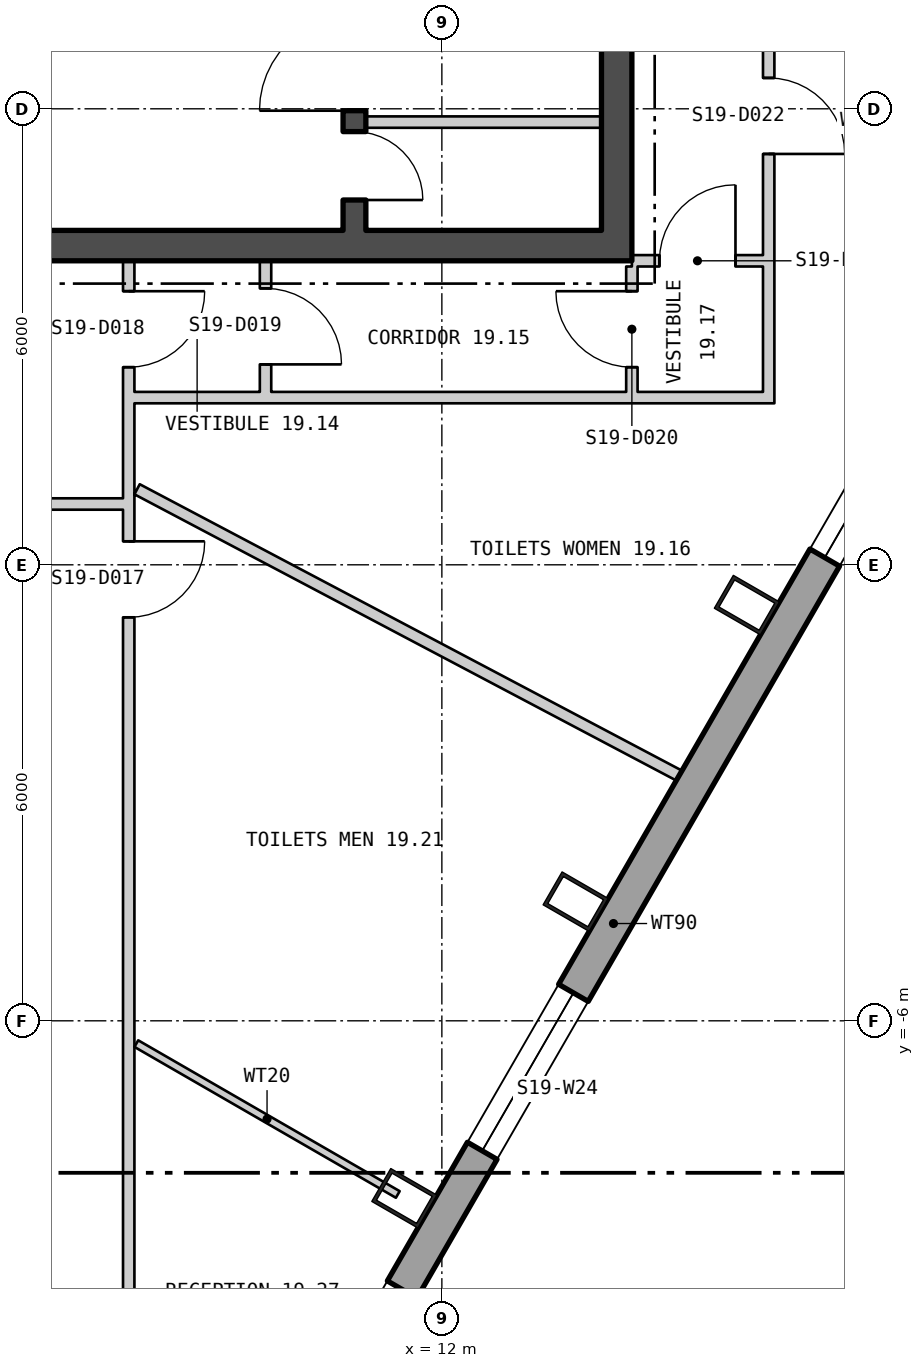
"""IFC4 building model, lengths in metres.
Left out: names, types, materials, properties, quantities, classifications, styles, units other than length and angle.
Written with IfcOpenShell. Run it as: python <this file> out.ifc"""

import sys

from ifc_helpers import new_model, si_unit, direction, frame, frame_2d, origin, origin_2d, place, context, subcontext, project, spatial, polyline, rectangle, hollow_rectangle, outline, extrude, element, fill, save


model = new_model("IFC4")
c1 = context("Model", 3, precision=1e-05, world=origin(), true_north=direction((0.0, 1.0)))
c2 = subcontext(c1, "Body", "Model", "MODEL_VIEW")
j1 = project(units=[si_unit("LENGTHUNIT", "METRE"), si_unit("PLANEANGLEUNIT", "RADIAN")], contexts=[c1])
p1 = place(None, origin())
s1 = spatial("IfcSite", under=j1, at=p1, CompositionType="ELEMENT")
p2 = place(p1, origin())
s2 = spatial("IfcBuilding", under=s1, at=p2, CompositionType="ELEMENT")
p3 = place(p2, frame((0.0, 0.0, 257.1)))
s3 = spatial("IfcBuildingStorey", under=s2, at=p3, CompositionType="ELEMENT", Elevation=257.1)
for number, where, z_axis, x_axis in (
    (1, (11.506, -8.335, 0.0), (0.0, 0.0, 1.0), (0.5, 0.866, 0.0)),
    (2, (13.76, -4.432, 0.0), (0.0, 0.0, 1.0), (0.5, 0.866, 0.0)),
    (3, (16.013, -0.53, 0.0), (0.0, 0.0, 1.0), (0.5, 0.866, 0.0)),
):
    element("IfcColumn", number, at=place(p3, frame(where, z_axis=z_axis, x_axis=x_axis)), inside=s3, PredefinedType="COLUMN", context=c2, shape_type="SweptSolid", body=[
        extrude(hollow_rectangle(XDim=0.5, YDim=0.7, WallThickness=0.045, at=origin_2d()), origin(), (0.0, 0.0, 1.0), 3.9),
    ])
p4 = place(p3, frame((2.825, -24.522, -0.18), z_axis=(0.0, 0.0, 1.0), x_axis=(0.500000141277, 0.866025322218, 0.0)))
e4 = element("IfcWall", 4, at=p4, inside=s3, PredefinedType="SOLIDWALL", context=c2, shape_type="SweptSolid", body=[
    extrude(outline(polyline([(-0.13, -0.225), (45.86, -0.225), (45.6, 0.225), (0.13, 0.225), (-0.13, -0.225)])), origin(), (0.0, 0.0, 1.0), 3.68),
])
p5 = place(p4, frame((1.424, 0.0, 1.08)))
e5 = element("IfcOpeningElement", 5, at=p5, cuts=e4, PredefinedType="OPENING", context=c2, shape_type="SweptSolid", body=[
    extrude(rectangle(XDim=2.4, YDim=2.0, at=frame_2d((1.2, 1.0))), frame((0.0, 0.235, 0.0), z_axis=(0.0, -1.0, 0.0), x_axis=(1.0, 0.0, 0.0)), (0.0, 0.0, 1.0), 0.47),
])
p6 = place(p4, frame((5.892, 0.0, 1.08)))
e6 = element("IfcOpeningElement", 6, at=p6, cuts=e4, PredefinedType="OPENING", context=c2, shape_type="SweptSolid", body=[
    extrude(rectangle(XDim=2.4, YDim=2.0, at=frame_2d((1.2, 1.0))), frame((0.0, 0.235, 0.0), z_axis=(0.0, -1.0, 0.0), x_axis=(1.0, 0.0, 0.0)), (0.0, 0.0, 1.0), 0.47),
])
p7 = place(p4, frame((10.399, 0.0, 1.08)))
e7 = element("IfcOpeningElement", 7, at=p7, cuts=e4, PredefinedType="OPENING", context=c2, shape_type="SweptSolid", body=[
    extrude(rectangle(XDim=2.4, YDim=2.0, at=frame_2d((1.2, 1.0))), frame((0.0, 0.235, 0.0), z_axis=(0.0, -1.0, 0.0), x_axis=(1.0, 0.0, 0.0)), (0.0, 0.0, 1.0), 0.47),
])
p8 = place(p4, frame((14.905, 0.0, 1.08)))
e8 = element("IfcOpeningElement", 8, at=p8, cuts=e4, PredefinedType="OPENING", context=c2, shape_type="SweptSolid", body=[
    extrude(rectangle(XDim=2.4, YDim=2.0, at=frame_2d((1.2, 1.0))), frame((0.0, 0.235, 0.0), z_axis=(0.0, -1.0, 0.0), x_axis=(1.0, 0.0, 0.0)), (0.0, 0.0, 1.0), 0.47),
])
p9 = place(p4, frame((19.412, 0.0, 1.08)))
e9 = element("IfcOpeningElement", 9, at=p9, cuts=e4, PredefinedType="OPENING", context=c2, shape_type="SweptSolid", body=[
    extrude(rectangle(XDim=2.4, YDim=2.0, at=frame_2d((1.2, 1.0))), frame((0.0, 0.235, 0.0), z_axis=(0.0, -1.0, 0.0), x_axis=(1.0, 0.0, 0.0)), (0.0, 0.0, 1.0), 0.47),
])
p10 = place(p4, frame((28.425, 0.0, 1.08)))
e10 = element("IfcOpeningElement", 10, at=p10, cuts=e4, PredefinedType="OPENING", context=c2, shape_type="SweptSolid", body=[
    extrude(rectangle(XDim=2.4, YDim=2.0, at=frame_2d((1.2, 1.0))), frame((0.0, 0.235, 0.0), z_axis=(0.0, -1.0, 0.0), x_axis=(1.0, 0.0, 0.0)), (0.0, 0.0, 1.0), 0.47),
])
p11 = place(p4, frame((37.438, 0.0, 1.08)))
e11 = element("IfcOpeningElement", 11, at=p11, cuts=e4, PredefinedType="OPENING", context=c2, shape_type="SweptSolid", body=[
    extrude(rectangle(XDim=2.4, YDim=2.0, at=frame_2d((1.2, 1.0))), frame((0.0, 0.235, 0.0), z_axis=(0.0, -1.0, 0.0), x_axis=(1.0, 0.0, 0.0)), (0.0, 0.0, 1.0), 0.47),
])
p12 = place(p4, frame((41.907, 0.0, 1.08)))
e12 = element("IfcOpeningElement", 12, at=p12, cuts=e4, PredefinedType="OPENING", context=c2, shape_type="SweptSolid", body=[
    extrude(rectangle(XDim=2.4, YDim=2.0, at=frame_2d((1.2, 1.0))), frame((0.0, 0.235, 0.0), z_axis=(0.0, -1.0, 0.0), x_axis=(1.0, 0.0, 0.0)), (0.0, 0.0, 1.0), 0.47),
])
p13 = place(p3, frame((-14.5, 4.2, 0.0), z_axis=(0.0, 0.0, 1.0), x_axis=(1.0, 0.0, 0.0)))
e13 = element("IfcWall", 13, at=p13, inside=s3, PredefinedType="SHEAR", context=c2, shape_type="SweptSolid", body=[
    extrude(rectangle(XDim=29.0, YDim=0.4, at=frame_2d((14.5, 0.0))), origin(), (0.0, 0.0, 1.0), 3.7),
])
p14 = place(p13, frame((9.0, 0.0, 0.0)))
e14 = element("IfcOpeningElement", 14, at=p14, cuts=e13, PredefinedType="OPENING", context=c2, shape_type="SweptSolid", body=[
    extrude(rectangle(XDim=1.8, YDim=2.4, at=frame_2d((0.9, 1.2))), frame((0.0, 0.21, 0.0), z_axis=(0.0, -1.0, 0.0), x_axis=(1.0, 0.0, 0.0)), (0.0, 0.0, 1.0), 0.42),
])
p15 = place(p13, frame((19.0, 0.0, 0.0)))
e15 = element("IfcOpeningElement", 15, at=p15, cuts=e13, PredefinedType="OPENING", context=c2, shape_type="SweptSolid", body=[
    extrude(rectangle(XDim=1.8, YDim=2.4, at=frame_2d((0.9, 1.2))), frame((0.0, 0.21, 0.0), z_axis=(0.0, -1.0, 0.0), x_axis=(1.0, 0.0, 0.0)), (0.0, 0.0, 1.0), 0.42),
])
p16 = place(p3, frame((14.3, 4.4, 0.0), z_axis=(0.0, 0.0, 1.0), x_axis=(0.0, 1.0, 0.0)))
e16 = element("IfcWall", 16, at=p16, inside=s3, PredefinedType="SHEAR", context=c2, shape_type="SweptSolid", body=[
    extrude(rectangle(XDim=13.2, YDim=0.4, at=frame_2d((6.6, 0.0))), origin(), (0.0, 0.0, 1.0), 3.7),
])
p17 = place(p16, frame((3.05, 0.0, 0.0)))
e17 = element("IfcOpeningElement", 17, at=p17, cuts=e16, PredefinedType="OPENING", context=c2, shape_type="SweptSolid", body=[
    extrude(rectangle(XDim=1.5, YDim=2.1, at=frame_2d((0.75, 1.05))), frame((0.0, 0.21, 0.0), z_axis=(0.0, -1.0, 0.0), x_axis=(1.0, 0.0, 0.0)), (0.0, 0.0, 1.0), 0.42),
])
p18 = place(p3, frame((10.85, 4.4, 0.0), z_axis=(0.0, 0.0, 1.0), x_axis=(0.0, 1.0, 0.0)))
e18 = element("IfcWall", 18, at=p18, inside=s3, PredefinedType="SHEAR", context=c2, shape_type="SweptSolid", body=[
    extrude(rectangle(XDim=13.2, YDim=0.3, at=frame_2d((6.6, 0.0))), origin(), (0.0, 0.0, 1.0), 3.7),
])
p19 = place(p18, frame((1.575, 0.0, 0.0)))
e19 = element("IfcOpeningElement", 19, at=p19, cuts=e18, PredefinedType="OPENING", context=c2, shape_type="SweptSolid", body=[
    extrude(rectangle(XDim=1.25, YDim=2.1, at=frame_2d((0.625, 1.05))), frame((0.0, 0.16, 0.0), z_axis=(0.0, -1.0, 0.0), x_axis=(1.0, 0.0, 0.0)), (0.0, 0.0, 1.0), 0.32),
])
p20 = place(p18, frame((0.4, 0.0, 0.0)))
e20 = element("IfcOpeningElement", 20, at=p20, cuts=e18, PredefinedType="OPENING", context=c2, shape_type="SweptSolid", body=[
    extrude(rectangle(XDim=0.9, YDim=2.1, at=frame_2d((0.45, 1.05))), frame((0.0, 0.16, 0.0), z_axis=(0.0, -1.0, 0.0), x_axis=(1.0, 0.0, 0.0)), (0.0, 0.0, 1.0), 0.32),
])
p21 = place(p3, frame((11.0, 5.825, 0.0), z_axis=(0.0, 0.0, 1.0), x_axis=(1.0, 0.0, 0.0)))
e21 = element("IfcWall", 21, at=p21, inside=s3, PredefinedType="PARTITIONING", context=c2, shape_type="SweptSolid", body=[
    extrude(rectangle(XDim=3.1, YDim=0.15, at=frame_2d((1.55, 0.0))), origin(), (0.0, 0.0, 1.0), 3.7),
])
p22 = place(p3, frame((-7.805, 0.8, 0.0), z_axis=(0.0, 0.0, 1.0), x_axis=(1.0, 0.0, 0.0)))
e22 = element("IfcWall", 22, at=p22, inside=s3, PredefinedType="PARTITIONING", context=c2, shape_type="SweptSolid", body=[
    extrude(rectangle(XDim=15.61, YDim=0.15, at=frame_2d((7.805, 0.0))), origin(), (0.0, 0.0, 1.0), 3.7),
])
p23 = place(p22, frame((1.168, 0.0, 0.0)))
e23 = element("IfcOpeningElement", 23, at=p23, cuts=e22, PredefinedType="OPENING", context=c2, shape_type="SweptSolid", body=[
    extrude(rectangle(XDim=1.0, YDim=2.1, at=frame_2d((0.5, 1.05))), frame((0.0, 0.085, 0.0), z_axis=(0.0, -1.0, 0.0), x_axis=(1.0, 0.0, 0.0)), (0.0, 0.0, 1.0), 0.17),
])
p24 = place(p22, frame((6.399, 0.0, 0.0)))
e24 = element("IfcOpeningElement", 24, at=p24, cuts=e22, PredefinedType="OPENING", context=c2, shape_type="SweptSolid", body=[
    extrude(rectangle(XDim=1.0, YDim=2.1, at=frame_2d((0.5, 1.05))), frame((0.0, 0.085, 0.0), z_axis=(0.0, -1.0, 0.0), x_axis=(1.0, 0.0, 0.0)), (0.0, 0.0, 1.0), 0.17),
])
p25 = place(p22, frame((8.006, 0.0, 0.0)))
e25 = element("IfcOpeningElement", 25, at=p25, cuts=e22, PredefinedType="OPENING", context=c2, shape_type="SweptSolid", body=[
    extrude(rectangle(XDim=1.0, YDim=2.1, at=frame_2d((0.5, 1.05))), frame((0.0, 0.085, 0.0), z_axis=(0.0, -1.0, 0.0), x_axis=(1.0, 0.0, 0.0)), (0.0, 0.0, 1.0), 0.17),
])
p26 = place(p22, frame((13.441, 0.0, 0.0)))
e26 = element("IfcOpeningElement", 26, at=p26, cuts=e22, PredefinedType="OPENING", context=c2, shape_type="SweptSolid", body=[
    extrude(rectangle(XDim=1.0, YDim=2.1, at=frame_2d((0.5, 1.05))), frame((0.0, 0.085, 0.0), z_axis=(0.0, -1.0, 0.0), x_axis=(1.0, 0.0, 0.0)), (0.0, 0.0, 1.0), 0.17),
])
p27 = place(p3, frame((7.88, -13.675, 0.0), z_axis=(0.0, 0.0, 1.0), x_axis=(0.0, 1.0, 0.0)))
e27 = element("IfcWall", 27, at=p27, inside=s3, PredefinedType="PARTITIONING", context=c2, shape_type="SweptSolid", body=[
    extrude(rectangle(XDim=17.675, YDim=0.15, at=frame_2d((8.838, 0.0))), origin(), (0.0, 0.0, 1.0), 3.7),
])
p28 = place(p27, frame((12.984, 0.0, 0.0)))
e28 = element("IfcOpeningElement", 28, at=p28, cuts=e27, PredefinedType="OPENING", context=c2, shape_type="SweptSolid", body=[
    extrude(rectangle(XDim=1.0, YDim=2.1, at=frame_2d((0.5, 1.05))), frame((0.0, 0.085, 0.0), z_axis=(0.0, -1.0, 0.0), x_axis=(1.0, 0.0, 0.0)), (0.0, 0.0, 1.0), 0.17),
])
p29 = place(p27, frame((16.275, 0.0, 0.0)))
e29 = element("IfcOpeningElement", 29, at=p29, cuts=e27, PredefinedType="OPENING", context=c2, shape_type="SweptSolid", body=[
    extrude(rectangle(XDim=1.0, YDim=2.1, at=frame_2d((0.5, 1.05))), frame((0.0, 0.085, 0.0), z_axis=(0.0, -1.0, 0.0), x_axis=(1.0, 0.0, 0.0)), (0.0, 0.0, 1.0), 0.17),
])
p30 = place(p3, frame((7.955, 2.2, 0.0), z_axis=(0.0, 0.0, 1.0), x_axis=(1.0, 0.0, 0.0)))
e30 = element("IfcWall", 30, at=p30, inside=s3, PredefinedType="PARTITIONING", context=c2, shape_type="SweptSolid", body=[
    extrude(rectangle(XDim=8.27, YDim=0.15, at=frame_2d((4.135, 0.0))), origin(), (0.0, 0.0, 1.0), 3.7),
])
p31 = place(p3, frame((7.98, -6.3, 0.0), z_axis=(0.0, 0.0, 1.0), x_axis=(0.866143665252, -0.499795109164, 0.0)))
e31 = element("IfcWall", 31, at=p31, inside=s3, PredefinedType="PARTITIONING", context=c2, shape_type="SweptSolid", body=[
    extrude(rectangle(XDim=3.972, YDim=0.1, at=frame_2d((1.986, 0.0))), origin(), (0.0, 0.0, 1.0), 3.7),
])
p32 = place(p3, frame((7.99, 0.994, 0.0), z_axis=(0.0, 0.0, 1.0), x_axis=(0.88420981039, -0.467089939102, 0.0)))
e32 = element("IfcWall", 32, at=p32, inside=s3, PredefinedType="PARTITIONING", context=c2, shape_type="SweptSolid", body=[
    extrude(rectangle(XDim=8.065, YDim=0.15, at=frame_2d((4.032, 0.0))), origin(), (0.0, 0.0, 1.0), 3.7),
])
p33 = place(p3, frame((9.68, 2.275, 0.0), z_axis=(0.0, 0.0, 1.0), x_axis=(0.0, 1.0, 0.0)))
e33 = element("IfcWall", 33, at=p33, inside=s3, PredefinedType="PARTITIONING", context=c2, shape_type="SweptSolid", body=[
    extrude(rectangle(XDim=1.725, YDim=0.15, at=frame_2d((0.863, 0.0))), origin(), (0.0, 0.0, 1.0), 3.7),
])
p34 = place(p33, frame((0.362, 0.0, 0.0)))
e34 = element("IfcOpeningElement", 34, at=p34, cuts=e33, PredefinedType="OPENING", context=c2, shape_type="SweptSolid", body=[
    extrude(rectangle(XDim=1.0, YDim=2.1, at=frame_2d((0.5, 1.05))), frame((0.0, 0.085, 0.0), z_axis=(0.0, -1.0, 0.0), x_axis=(1.0, 0.0, 0.0)), (0.0, 0.0, 1.0), 0.17),
])
p35 = place(p3, frame((14.5, 2.275, 0.0), z_axis=(0.0, 0.0, 1.0), x_axis=(0.0, 1.0, 0.0)))
e35 = element("IfcWall", 35, at=p35, inside=s3, PredefinedType="PARTITIONING", context=c2, shape_type="SweptSolid", body=[
    extrude(rectangle(XDim=1.65, YDim=0.15, at=frame_2d((0.825, 0.0))), origin(), (0.0, 0.0, 1.0), 3.7),
])
p36 = place(p35, frame((0.325, 0.0, 0.0)))
e36 = element("IfcOpeningElement", 36, at=p36, cuts=e35, PredefinedType="OPENING", context=c2, shape_type="SweptSolid", body=[
    extrude(rectangle(XDim=1.0, YDim=2.1, at=frame_2d((0.5, 1.05))), frame((0.0, 0.085, 0.0), z_axis=(0.0, -1.0, 0.0), x_axis=(1.0, 0.0, 0.0)), (0.0, 0.0, 1.0), 0.17),
])
p37 = place(p3, frame((14.5, 4.0, 0.0), z_axis=(0.0, 0.0, 1.0), x_axis=(1.0, 0.0, 0.0)))
e37 = element("IfcWall", 37, at=p37, inside=s3, PredefinedType="PARTITIONING", context=c2, shape_type="SweptSolid", body=[
    extrude(rectangle(XDim=1.725, YDim=0.15, at=frame_2d((0.863, 0.0))), origin(), (0.0, 0.0, 1.0), 3.16),
])
p38 = place(p37, frame((0.363, 0.0, 0.0)))
e38 = element("IfcOpeningElement", 38, at=p38, cuts=e37, PredefinedType="OPENING", context=c2, shape_type="SweptSolid", body=[
    extrude(rectangle(XDim=1.0, YDim=2.1, at=frame_2d((0.5, 1.05))), frame((0.0, 0.085, 0.0), z_axis=(0.0, -1.0, 0.0), x_axis=(1.0, 0.0, 0.0)), (0.0, 0.0, 1.0), 0.17),
])
p39 = place(p3, frame((16.3, 2.125, 0.0), z_axis=(0.0, 0.0, 1.0), x_axis=(0.0, 1.0, 0.0)))
e39 = element("IfcWall", 39, at=p39, inside=s3, PredefinedType="PARTITIONING", context=c2, shape_type="SweptSolid", body=[
    extrude(rectangle(XDim=17.622, YDim=0.15, at=frame_2d((8.811, 0.0))), origin(), (0.0, 0.0, 1.0), 3.7),
])
p40 = place(p39, frame((3.281, 0.0, 0.0)))
e40 = element("IfcOpeningElement", 40, at=p40, cuts=e39, PredefinedType="OPENING", context=c2, shape_type="SweptSolid", body=[
    extrude(rectangle(XDim=1.0, YDim=2.1, at=frame_2d((0.5, 1.05))), frame((0.0, 0.085, 0.0), z_axis=(0.0, -1.0, 0.0), x_axis=(1.0, 0.0, 0.0)), (0.0, 0.0, 1.0), 0.17),
])
p41 = place(p39, frame((5.853, 0.0, 0.0)))
e41 = element("IfcOpeningElement", 41, at=p41, cuts=e39, PredefinedType="OPENING", context=c2, shape_type="SweptSolid", body=[
    extrude(rectangle(XDim=0.9, YDim=2.1, at=frame_2d((0.45, 1.05))), frame((0.0, 0.085, 0.0), z_axis=(0.0, -1.0, 0.0), x_axis=(1.0, 0.0, 0.0)), (0.0, 0.0, 1.0), 0.17),
])
p42 = place(p39, frame((8.692, 0.0, 0.0)))
e42 = element("IfcOpeningElement", 42, at=p42, cuts=e39, PredefinedType="OPENING", context=c2, shape_type="SweptSolid", body=[
    extrude(rectangle(XDim=1.0, YDim=2.1, at=frame_2d((0.5, 1.05))), frame((0.0, 0.085, 0.0), z_axis=(0.0, -1.0, 0.0), x_axis=(1.0, 0.0, 0.0)), (0.0, 0.0, 1.0), 0.17),
])
p43 = place(p39, frame((13.611, 0.0, 0.0)))
e43 = element("IfcOpeningElement", 43, at=p43, cuts=e39, PredefinedType="OPENING", context=c2, shape_type="SweptSolid", body=[
    extrude(rectangle(XDim=1.0, YDim=2.1, at=frame_2d((0.5, 1.05))), frame((0.0, 0.085, 0.0), z_axis=(0.0, -1.0, 0.0), x_axis=(1.0, 0.0, 0.0)), (0.0, 0.0, 1.0), 0.17),
])
p44 = place(p3, frame((16.41, 7.717, 0.0), z_axis=(0.0, 0.0, 1.0), x_axis=(0.716434135664, -0.697654734991, 0.0)))
e44 = element("IfcWall", 44, at=p44, inside=s3, PredefinedType="PARTITIONING", context=c2, shape_type="SweptSolid", body=[
    extrude(rectangle(XDim=4.26, YDim=0.1, at=frame_2d((2.13, 0.0))), origin(), (0.0, 0.0, 1.0), 3.7),
])
p45 = place(p8, origin())
e45 = element("IfcWindow", 45, at=p45, inside=s3, PartitioningType="SINGLE_PANEL", PredefinedType="WINDOW", context=c2, shape_type="SweptSolid", body=[
    extrude(rectangle(XDim=2.4, YDim=2.0, at=frame_2d((1.2, 1.0))), frame((0.0, 0.105, 0.0), z_axis=(0.0, -1.0, 0.0), x_axis=(1.0, 0.0, 0.0)), (0.0, 0.0, 1.0), 0.06),
])
fill(e8, e45)
p46 = place(p9, origin())
e46 = element("IfcWindow", 46, at=p46, inside=s3, PartitioningType="SINGLE_PANEL", PredefinedType="WINDOW", context=c2, shape_type="SweptSolid", body=[
    extrude(rectangle(XDim=2.4, YDim=2.0, at=frame_2d((1.2, 1.0))), frame((0.0, 0.105, 0.0), z_axis=(0.0, -1.0, 0.0), x_axis=(1.0, 0.0, 0.0)), (0.0, 0.0, 1.0), 0.06),
])
fill(e9, e46)
p47 = place(p10, origin())
e47 = element("IfcWindow", 47, at=p47, inside=s3, PartitioningType="SINGLE_PANEL", PredefinedType="WINDOW", context=c2, shape_type="SweptSolid", body=[
    extrude(rectangle(XDim=2.4, YDim=2.0, at=frame_2d((1.2, 1.0))), frame((0.0, 0.105, 0.0), z_axis=(0.0, -1.0, 0.0), x_axis=(1.0, 0.0, 0.0)), (0.0, 0.0, 1.0), 0.06),
])
fill(e10, e47)
p48 = place(p19, origin())
e48 = element("IfcDoor", 48, at=p48, inside=s3, OperationType="SINGLE_SWING_RIGHT", PredefinedType="DOOR", context=c2, shape_type="SweptSolid", body=[
    extrude(rectangle(XDim=1.25, YDim=2.1, at=frame_2d((0.625, 1.05))), frame((0.0, 0.025, 0.0), z_axis=(0.0, -1.0, 0.0), x_axis=(1.0, 0.0, 0.0)), (0.0, 0.0, 1.0), 0.05),
])
fill(e19, e48)
p49 = place(p20, origin())
e49 = element("IfcDoor", 49, at=p49, inside=s3, OperationType="SINGLE_SWING_LEFT", PredefinedType="DOOR", context=c2, shape_type="SweptSolid", body=[
    extrude(rectangle(XDim=0.9, YDim=2.1, at=frame_2d((0.45, 1.05))), frame((0.0, 0.025, 0.0), z_axis=(0.0, -1.0, 0.0), x_axis=(1.0, 0.0, 0.0)), (0.0, 0.0, 1.0), 0.05),
])
fill(e20, e49)
p50 = place(p28, origin())
e50 = element("IfcDoor", 50, at=p50, inside=s3, OperationType="SINGLE_SWING_RIGHT", PredefinedType="DOOR", context=c2, shape_type="SweptSolid", body=[
    extrude(rectangle(XDim=1.0, YDim=2.1, at=frame_2d((0.5, 1.05))), frame((0.0, 0.025, 0.0), z_axis=(0.0, -1.0, 0.0), x_axis=(1.0, 0.0, 0.0)), (0.0, 0.0, 1.0), 0.05),
])
fill(e28, e50)
p51 = place(p29, origin())
e51 = element("IfcDoor", 51, at=p51, inside=s3, OperationType="SINGLE_SWING_RIGHT", PredefinedType="DOOR", context=c2, shape_type="SweptSolid", body=[
    extrude(rectangle(XDim=1.0, YDim=2.1, at=frame_2d((0.5, 1.05))), frame((0.0, 0.025, 0.0), z_axis=(0.0, -1.0, 0.0), x_axis=(1.0, 0.0, 0.0)), (0.0, 0.0, 1.0), 0.05),
])
fill(e29, e51)
p52 = place(p34, origin())
e52 = element("IfcDoor", 52, at=p52, inside=s3, OperationType="SINGLE_SWING_LEFT", PredefinedType="DOOR", context=c2, shape_type="SweptSolid", body=[
    extrude(rectangle(XDim=1.0, YDim=2.1, at=frame_2d((0.5, 1.05))), frame((0.0, 0.025, 0.0), z_axis=(0.0, -1.0, 0.0), x_axis=(1.0, 0.0, 0.0)), (0.0, 0.0, 1.0), 0.05),
])
fill(e34, e52)
p53 = place(p36, origin())
e53 = element("IfcDoor", 53, at=p53, inside=s3, OperationType="SINGLE_SWING_LEFT", PredefinedType="DOOR", context=c2, shape_type="SweptSolid", body=[
    extrude(rectangle(XDim=1.0, YDim=2.1, at=frame_2d((0.5, 1.05))), frame((0.0, 0.025, 0.0), z_axis=(0.0, -1.0, 0.0), x_axis=(1.0, 0.0, 0.0)), (0.0, 0.0, 1.0), 0.05),
])
fill(e36, e53)
p54 = place(p38, origin())
e54 = element("IfcDoor", 54, at=p54, inside=s3, OperationType="SINGLE_SWING_LEFT", PredefinedType="DOOR", context=c2, shape_type="SweptSolid", body=[
    extrude(rectangle(XDim=1.0, YDim=2.1, at=frame_2d((0.5, 1.05))), frame((0.0, 0.025, 0.0), z_axis=(0.0, -1.0, 0.0), x_axis=(1.0, 0.0, 0.0)), (0.0, 0.0, 1.0), 0.05),
])
fill(e38, e54)
p55 = place(p40, origin())
e55 = element("IfcDoor", 55, at=p55, inside=s3, OperationType="SINGLE_SWING_LEFT", PredefinedType="DOOR", context=c2, shape_type="SweptSolid", body=[
    extrude(rectangle(XDim=1.0, YDim=2.1, at=frame_2d((0.5, 1.05))), frame((0.0, 0.025, 0.0), z_axis=(0.0, -1.0, 0.0), x_axis=(1.0, 0.0, 0.0)), (0.0, 0.0, 1.0), 0.05),
])
fill(e40, e55)
save(model, sys.argv[1])
